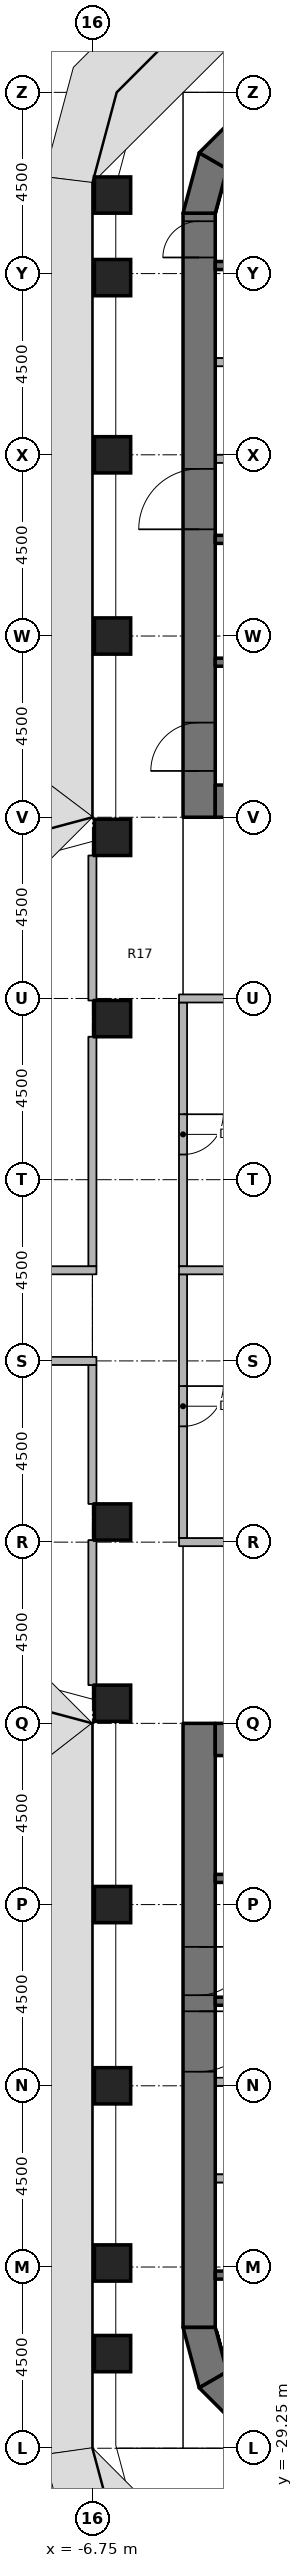
"""IFC4 building model, lengths in metres.
Left out: names, types, materials, properties, quantities, classifications, styles, units other than length and angle.
Written with IfcOpenShell. Run it as: python <this file> out.ifc"""

import sys

from ifc_helpers import new_model, si_unit, direction, frame, frame_2d, origin, origin_2d, place, context, subcontext, project, spatial, polyline, rectangle, outline, extrude, element, fill, save


model = new_model("IFC4")
c1 = context("Model", 3, precision=1e-05, world=origin(), true_north=direction((0.0, 1.0)))
c2 = subcontext(c1, "Body", "Model", "MODEL_VIEW")
j1 = project(units=[si_unit("LENGTHUNIT", "METRE"), si_unit("PLANEANGLEUNIT", "RADIAN")], contexts=[c1])
p1 = place(None, origin())
s1 = spatial("IfcSite", under=j1, at=p1, CompositionType="ELEMENT")
p2 = place(p1, origin())
s2 = spatial("IfcBuilding", under=s1, at=p2, CompositionType="ELEMENT")
p3 = place(p2, frame((0.0, 0.0, 109.4)))
s3 = spatial("IfcBuildingStorey", under=s2, at=p3, CompositionType="ELEMENT", Elevation=109.4)
for number, where, z_axis, x_axis in (
    (1, (-6.25, -26.9, 0.0), (0.0, 0.0, 1.0), (1.0, 0.0, 0.0)),
    (2, (-6.25, -24.65, 0.0), (0.0, 0.0, 1.0), (1.0, 0.0, 0.0)),
    (3, (-6.25, -20.25, 0.0), (0.0, 0.0, 1.0), (1.0, 0.0, 0.0)),
    (4, (-6.25, -15.75, 0.0), (0.0, 0.0, 1.0), (1.0, 0.0, 0.0)),
    (5, (-6.25, -10.75, 0.0), (0.0, 0.0, 1.0), (1.0, 0.0, 0.0)),
    (6, (-6.25, -6.25, 0.0), (0.0, 0.0, 1.0), (1.0, 0.0, 0.0)),
    (7, (-6.25, 6.25, 0.0), (0.0, 0.0, 1.0), (1.0, 0.0, 0.0)),
    (8, (-6.25, 10.75, 0.0), (0.0, 0.0, 1.0), (1.0, 0.0, 0.0)),
    (9, (-6.25, 15.75, 0.0), (0.0, 0.0, 1.0), (1.0, 0.0, 0.0)),
    (10, (-6.25, 20.25, 0.0), (0.0, 0.0, 1.0), (1.0, 0.0, 0.0)),
    (11, (-6.25, 24.65, 0.0), (0.0, 0.0, 1.0), (1.0, 0.0, 0.0)),
    (12, (-6.25, 26.7, 0.0), (0.0, 0.0, 1.0), (1.0, 0.0, 0.0)),
):
    element("IfcColumn", number, at=place(p3, frame(where, z_axis=z_axis, x_axis=x_axis)), inside=s3, PredefinedType="COLUMN", context=c2, shape_type="SweptSolid", body=[
        extrude(rectangle(XDim=0.9, YDim=0.9, at=origin_2d()), origin(), (0.0, 0.0, 1.0), 3.65),
    ])
p4 = place(p3, frame((-4.1, 11.25, 0.0), z_axis=(0.0, 0.0, 1.0), x_axis=(0.0, 1.0, 0.0)))
e13 = element("IfcWall", 13, at=p4, inside=s3, PredefinedType="SHEAR", context=c2, shape_type="SweptSolid", body=[
    extrude(rectangle(XDim=15.0, YDim=0.8, at=frame_2d((7.5, 0.0))), origin(), (0.0, 0.0, 1.0), 3.8),
])
p5 = place(p4, frame((7.15, 0.0, 0.0)))
e14 = element("IfcOpeningElement", 14, at=p5, cuts=e13, PredefinedType="OPENING", context=c2, shape_type="SweptSolid", body=[
    extrude(rectangle(XDim=1.5, YDim=2.3, at=frame_2d((0.75, 1.15))), frame((0.0, 0.41, 0.0), z_axis=(0.0, -1.0, 0.0), x_axis=(1.0, 0.0, 0.0)), (0.0, 0.0, 1.0), 0.82),
])
p6 = place(p4, frame((13.9, 0.0, 0.0)))
e15 = element("IfcOpeningElement", 15, at=p6, cuts=e13, PredefinedType="OPENING", context=c2, shape_type="SweptSolid", body=[
    extrude(rectangle(XDim=0.9, YDim=2.1, at=frame_2d((0.45, 1.05))), frame((0.0, 0.41, 0.0), z_axis=(0.0, -1.0, 0.0), x_axis=(1.0, 0.0, 0.0)), (0.0, 0.0, 1.0), 0.82),
])
p7 = place(p4, frame((1.15, 0.0, 0.0)))
e16 = element("IfcOpeningElement", 16, at=p7, cuts=e13, PredefinedType="OPENING", context=c2, shape_type="SweptSolid", body=[
    extrude(rectangle(XDim=1.2, YDim=2.1, at=frame_2d((0.6, 1.05))), frame((0.0, 0.41, 0.0), z_axis=(0.0, -1.0, 0.0), x_axis=(1.0, 0.0, 0.0)), (0.0, 0.0, 1.0), 0.82),
])
p8 = place(p3, frame((-3.7, 11.65, 0.0), z_axis=(0.0, 0.0, 1.0), x_axis=(1.0, 0.0, 0.0)))
e17 = element("IfcWall", 17, at=p8, inside=s3, PredefinedType="SHEAR", context=c2, shape_type="SweptSolid", body=[
    extrude(rectangle(XDim=7.4, YDim=0.8, at=frame_2d((3.7, 0.0))), origin(), (0.0, 0.0, 1.0), 3.8),
])
p9 = place(p3, origin())
e18 = element("IfcWall", 18, at=p9, inside=s3, PredefinedType="SHEAR", context=c2, shape_type="SweptSolid", body=[
    extrude(outline(polyline([(-4.5, 26.25), (-4.098, 27.75), (-3.405, 27.35), (-3.7, 26.25), (-4.5, 26.25)])), origin(), (0.0, 0.0, 1.0), 3.8),
])
p10 = place(p3, origin())
e19 = element("IfcWall", 19, at=p10, inside=s3, PredefinedType="SHEAR", context=c2, shape_type="SweptSolid", body=[
    extrude(outline(polyline([(-4.098, 27.75), (-3.0, 28.848), (-2.6, 28.155), (-3.405, 27.35), (-4.098, 27.75)])), origin(), (0.0, 0.0, 1.0), 3.8),
])
p11 = place(p3, frame((-4.1, -11.25, 0.0), z_axis=(0.0, 0.0, 1.0), x_axis=(0.0, -1.0, 0.0)))
e20 = element("IfcWall", 20, at=p11, inside=s3, PredefinedType="SHEAR", context=c2, shape_type="SweptSolid", body=[
    extrude(rectangle(XDim=15.0, YDim=0.8, at=frame_2d((7.5, 0.0))), origin(), (0.0, 0.0, 1.0), 3.8),
])
p12 = place(p11, frame((7.15, 0.0, 0.0)))
e21 = element("IfcOpeningElement", 21, at=p12, cuts=e20, PredefinedType="OPENING", context=c2, shape_type="SweptSolid", body=[
    extrude(rectangle(XDim=1.5, YDim=2.3, at=frame_2d((0.75, 1.15))), frame((0.0, 0.41, 0.0), z_axis=(0.0, -1.0, 0.0), x_axis=(1.0, 0.0, 0.0)), (0.0, 0.0, 1.0), 0.82),
])
p13 = place(p11, frame((5.55, 0.0, 0.0)))
e22 = element("IfcOpeningElement", 22, at=p13, cuts=e20, PredefinedType="OPENING", context=c2, shape_type="SweptSolid", body=[
    extrude(rectangle(XDim=1.2, YDim=2.1, at=frame_2d((0.6, 1.05))), frame((0.0, 0.41, 0.0), z_axis=(0.0, -1.0, 0.0), x_axis=(1.0, 0.0, 0.0)), (0.0, 0.0, 1.0), 0.82),
])
p14 = place(p3, frame((-3.7, -11.65, 0.0), z_axis=(0.0, 0.0, 1.0), x_axis=(1.0, 0.0, 0.0)))
e23 = element("IfcWall", 23, at=p14, inside=s3, PredefinedType="SHEAR", context=c2, shape_type="SweptSolid", body=[
    extrude(rectangle(XDim=7.4, YDim=0.8, at=frame_2d((3.7, 0.0))), origin(), (0.0, 0.0, 1.0), 3.8),
])
p15 = place(p3, origin())
e24 = element("IfcWall", 24, at=p15, inside=s3, PredefinedType="SHEAR", context=c2, shape_type="SweptSolid", body=[
    extrude(outline(polyline([(-4.5, -26.25), (-4.098, -27.75), (-3.405, -27.35), (-3.7, -26.25), (-4.5, -26.25)])), origin(), (0.0, 0.0, 1.0), 3.8),
])
p16 = place(p3, origin())
e25 = element("IfcWall", 25, at=p16, inside=s3, PredefinedType="SHEAR", context=c2, shape_type="SweptSolid", body=[
    extrude(outline(polyline([(-4.098, -27.75), (-3.0, -28.848), (-2.6, -28.155), (-3.405, -27.35), (-4.098, -27.75)])), origin(), (0.0, 0.0, 1.0), 3.8),
])
for number, where, z_axis, x_axis in (
    (26, (-3.7, 24.95, 0.0), (0.0, 0.0, 1.0), (1.0, 0.0, 0.0)),
    (27, (-3.7, 18.15, 0.0), (0.0, 0.0, 1.0), (1.0, 0.0, 0.0)),
    (28, (-3.7, 15.1, 0.0), (0.0, 0.0, 1.0), (1.0, 0.0, 0.0)),
):
    element("IfcWall", number, at=place(p3, frame(where, z_axis=z_axis, x_axis=x_axis)), inside=s3, PredefinedType="SHEAR", context=c2, shape_type="SweptSolid", body=[
        extrude(rectangle(XDim=7.4, YDim=0.2, at=frame_2d((3.7, 0.0))), origin(), (0.0, 0.0, 1.0), 3.65),
    ])
p17 = place(p3, frame((-3.7, 20.15, 0.0), z_axis=(0.0, 0.0, 1.0), x_axis=(1.0, 0.0, 0.0)))
e29 = element("IfcWall", 29, at=p17, inside=s3, PredefinedType="PARTITIONING", context=c2, shape_type="SweptSolid", body=[
    extrude(rectangle(XDim=2.8, YDim=0.2, at=frame_2d((1.4, 0.0))), origin(), (0.0, 0.0, 1.0), 3.65),
])
p18 = place(p3, frame((-3.7, 22.55, 0.0), z_axis=(0.0, 0.0, 1.0), x_axis=(1.0, 0.0, 0.0)))
e30 = element("IfcWall", 30, at=p18, inside=s3, PredefinedType="PARTITIONING", context=c2, shape_type="SweptSolid", body=[
    extrude(rectangle(XDim=2.6, YDim=0.2, at=frame_2d((1.3, 0.0))), origin(), (0.0, 0.0, 1.0), 3.65),
])
for number, where, z_axis, x_axis in (
    (31, (3.7, -24.95, 0.0), (0.0, 0.0, 1.0), (-1.0, 0.0, 0.0)),
    (32, (3.7, -18.15, 0.0), (0.0, 0.0, 1.0), (-1.0, 0.0, 0.0)),
    (33, (3.7, -15.1, 0.0), (0.0, 0.0, 1.0), (-1.0, 0.0, 0.0)),
):
    element("IfcWall", number, at=place(p3, frame(where, z_axis=z_axis, x_axis=x_axis)), inside=s3, PredefinedType="SHEAR", context=c2, shape_type="SweptSolid", body=[
        extrude(rectangle(XDim=7.4, YDim=0.2, at=frame_2d((3.7, 0.0))), origin(), (0.0, 0.0, 1.0), 3.65),
    ])
p19 = place(p3, frame((-0.9, -20.15, 0.0), z_axis=(0.0, 0.0, 1.0), x_axis=(-1.0, 0.0, 0.0)))
e34 = element("IfcWall", 34, at=p19, inside=s3, PredefinedType="PARTITIONING", context=c2, shape_type="SweptSolid", body=[
    extrude(rectangle(XDim=2.8, YDim=0.2, at=frame_2d((1.4, 0.0))), origin(), (0.0, 0.0, 1.0), 3.65),
])
p20 = place(p3, frame((-1.1, -22.55, 0.0), z_axis=(0.0, 0.0, 1.0), x_axis=(-1.0, 0.0, 0.0)))
e35 = element("IfcWall", 35, at=p20, inside=s3, PredefinedType="PARTITIONING", context=c2, shape_type="SweptSolid", body=[
    extrude(rectangle(XDim=2.6, YDim=0.2, at=frame_2d((1.3, 0.0))), origin(), (0.0, 0.0, 1.0), 3.65),
])
p21 = place(p3, frame((-4.5, 6.65, 0.0), z_axis=(0.0, 0.0, 1.0), x_axis=(0.0, -1.0, 0.0)))
e36 = element("IfcWall", 36, at=p21, inside=s3, PredefinedType="PARTITIONING", context=c2, shape_type="SweptSolid", body=[
    extrude(rectangle(XDim=6.55, YDim=0.2, at=frame_2d((3.275, 0.0))), origin(), (0.0, 0.0, 1.0), 2.738),
])
p22 = place(p21, frame((2.775, 0.0, 0.0)))
e37 = element("IfcOpeningElement", 37, at=p22, cuts=e36, PredefinedType="OPENING", context=c2, shape_type="SweptSolid", body=[
    extrude(rectangle(XDim=1.0, YDim=2.1, at=frame_2d((0.5, 1.05))), frame((0.0, 0.11, 0.0), z_axis=(0.0, -1.0, 0.0), x_axis=(1.0, 0.0, 0.0)), (0.0, 0.0, 1.0), 0.22),
])
p23 = place(p3, frame((-4.5, -0.1, 0.0), z_axis=(0.0, 0.0, 1.0), x_axis=(0.0, -1.0, 0.0)))
e38 = element("IfcWall", 38, at=p23, inside=s3, PredefinedType="PARTITIONING", context=c2, shape_type="SweptSolid", body=[
    extrude(rectangle(XDim=6.55, YDim=0.2, at=frame_2d((3.275, 0.0))), origin(), (0.0, 0.0, 1.0), 2.738),
])
p24 = place(p23, frame((2.775, 0.0, 0.0)))
e39 = element("IfcOpeningElement", 39, at=p24, cuts=e38, PredefinedType="OPENING", context=c2, shape_type="SweptSolid", body=[
    extrude(rectangle(XDim=1.0, YDim=2.1, at=frame_2d((0.5, 1.05))), frame((0.0, 0.11, 0.0), z_axis=(0.0, -1.0, 0.0), x_axis=(1.0, 0.0, 0.0)), (0.0, 0.0, 1.0), 0.22),
])
p25 = place(p3, frame((-6.75, 0.1, 0.0), z_axis=(0.0, 0.0, 1.0), x_axis=(0.0, 1.0, 0.0)))
e40 = element("IfcWall", 40, at=p25, inside=s3, PredefinedType="PARTITIONING", context=c2, shape_type="SweptSolid", body=[
    extrude(rectangle(XDim=5.7, YDim=0.2, at=frame_2d((2.85, 0.0))), origin(), (0.0, 0.0, 1.0), 2.738),
])
for number, where, z_axis, x_axis in (
    (41, (-6.75, 6.7, 0.0), (0.0, 0.0, 1.0), (0.0, 1.0, 0.0)),
    (42, (-6.75, -10.3, 0.0), (0.0, 0.0, 1.0), (0.0, 1.0, 0.0)),
):
    element("IfcWall", number, at=place(p3, frame(where, z_axis=z_axis, x_axis=x_axis)), inside=s3, PredefinedType="PARTITIONING", context=c2, shape_type="SweptSolid", body=[
        extrude(rectangle(XDim=3.6, YDim=0.2, at=frame_2d((1.8, 0.0))), origin(), (0.0, 0.0, 1.0), 2.738),
    ])
p26 = place(p3, frame((-6.75, -5.8, 0.0), z_axis=(0.0, 0.0, 1.0), x_axis=(0.0, 1.0, 0.0)))
e43 = element("IfcWall", 43, at=p26, inside=s3, PredefinedType="PARTITIONING", context=c2, shape_type="SweptSolid", body=[
    extrude(rectangle(XDim=3.45, YDim=0.2, at=frame_2d((1.725, 0.0))), origin(), (0.0, 0.0, 1.0), 2.738),
])
for number, where, z_axis, x_axis in (
    (44, (-4.6, 6.75, 0.0), (0.0, 0.0, 1.0), (1.0, 0.0, 0.0)),
    (45, (-4.6, -6.75, 0.0), (0.0, 0.0, 1.0), (1.0, 0.0, 0.0)),
    (46, (-4.6, 0.0, 0.0), (0.0, 0.0, 1.0), (1.0, 0.0, 0.0)),
):
    element("IfcWall", number, at=place(p3, frame(where, z_axis=z_axis, x_axis=x_axis)), inside=s3, PredefinedType="PARTITIONING", context=c2, shape_type="SweptSolid", body=[
        extrude(rectangle(XDim=4.7, YDim=0.2, at=frame_2d((2.35, 0.0))), origin(), (0.0, 0.0, 1.0), 2.738),
    ])
p27 = place(p3, frame((-11.35, 0.0, 0.0), z_axis=(0.0, 0.0, 1.0), x_axis=(1.0, 0.0, 0.0)))
e47 = element("IfcWall", 47, at=p27, inside=s3, PredefinedType="PARTITIONING", context=c2, shape_type="SweptSolid", body=[
    extrude(rectangle(XDim=4.7, YDim=0.2, at=frame_2d((2.35, 0.0))), origin(), (0.0, 0.0, 1.0), 2.738),
])
p28 = place(p27, frame((1.85, 0.0, 0.0)))
e48 = element("IfcOpeningElement", 48, at=p28, cuts=e47, PredefinedType="OPENING", context=c2, shape_type="SweptSolid", body=[
    extrude(rectangle(XDim=1.0, YDim=2.1, at=frame_2d((0.5, 1.05))), frame((0.0, 0.11, 0.0), z_axis=(0.0, -1.0, 0.0), x_axis=(1.0, 0.0, 0.0)), (0.0, 0.0, 1.0), 0.22),
])
p29 = place(p3, frame((-6.65, -2.25, 0.0), z_axis=(0.0, 0.0, 1.0), x_axis=(-1.0, 0.0, 0.0)))
e49 = element("IfcWall", 49, at=p29, inside=s3, PredefinedType="PARTITIONING", context=c2, shape_type="SweptSolid", body=[
    extrude(rectangle(XDim=4.7, YDim=0.2, at=frame_2d((2.35, 0.0))), origin(), (0.0, 0.0, 1.0), 2.738),
])
p30 = place(p29, frame((1.85, 0.0, 0.0)))
e50 = element("IfcOpeningElement", 50, at=p30, cuts=e49, PredefinedType="OPENING", context=c2, shape_type="SweptSolid", body=[
    extrude(rectangle(XDim=1.0, YDim=2.1, at=frame_2d((0.5, 1.05))), frame((0.0, 0.11, 0.0), z_axis=(0.0, -1.0, 0.0), x_axis=(1.0, 0.0, 0.0)), (0.0, 0.0, 1.0), 0.22),
])
p31 = place(p5, origin())
e51 = element("IfcDoor", 51, at=p31, inside=s3, OperationType="DOUBLE_DOOR_SINGLE_SWING", PredefinedType="DOOR", context=c2, shape_type="SweptSolid", body=[
    extrude(rectangle(XDim=1.5, YDim=2.3, at=frame_2d((0.75, 1.15))), frame((0.0, 0.025, 0.0), z_axis=(0.0, -1.0, 0.0), x_axis=(1.0, 0.0, 0.0)), (0.0, 0.0, 1.0), 0.05),
])
fill(e14, e51)
p32 = place(p6, origin())
e52 = element("IfcDoor", 52, at=p32, inside=s3, OperationType="SINGLE_SWING_RIGHT", PredefinedType="DOOR", context=c2, shape_type="SweptSolid", body=[
    extrude(rectangle(XDim=0.9, YDim=2.1, at=frame_2d((0.45, 1.05))), frame((0.0, 0.025, 0.0), z_axis=(0.0, -1.0, 0.0), x_axis=(1.0, 0.0, 0.0)), (0.0, 0.0, 1.0), 0.05),
])
fill(e15, e52)
p33 = place(p7, origin())
e53 = element("IfcDoor", 53, at=p33, inside=s3, OperationType="SINGLE_SWING_LEFT", PredefinedType="DOOR", context=c2, shape_type="SweptSolid", body=[
    extrude(rectangle(XDim=1.2, YDim=2.1, at=frame_2d((0.6, 1.05))), frame((0.0, 0.025, 0.0), z_axis=(0.0, -1.0, 0.0), x_axis=(1.0, 0.0, 0.0)), (0.0, 0.0, 1.0), 0.05),
])
fill(e16, e53)
p34 = place(p12, origin())
e54 = element("IfcDoor", 54, at=p34, inside=s3, OperationType="DOUBLE_DOOR_SINGLE_SWING", PredefinedType="DOOR", context=c2, shape_type="SweptSolid", body=[
    extrude(rectangle(XDim=1.5, YDim=2.3, at=frame_2d((0.75, 1.15))), frame((0.0, 0.025, 0.0), z_axis=(0.0, -1.0, 0.0), x_axis=(1.0, 0.0, 0.0)), (0.0, 0.0, 1.0), 0.05),
])
fill(e21, e54)
p35 = place(p13, origin())
e55 = element("IfcDoor", 55, at=p35, inside=s3, OperationType="SINGLE_SWING_RIGHT", PredefinedType="DOOR", context=c2, shape_type="SweptSolid", body=[
    extrude(rectangle(XDim=1.2, YDim=2.1, at=frame_2d((0.6, 1.05))), frame((0.0, 0.025, 0.0), z_axis=(0.0, -1.0, 0.0), x_axis=(1.0, 0.0, 0.0)), (0.0, 0.0, 1.0), 0.05),
])
fill(e22, e55)
p36 = place(p22, origin())
e56 = element("IfcDoor", 56, at=p36, inside=s3, OperationType="SINGLE_SWING_RIGHT", PredefinedType="DOOR", context=c2, shape_type="SweptSolid", body=[
    extrude(rectangle(XDim=1.0, YDim=2.1, at=frame_2d((0.5, 1.05))), frame((0.0, 0.025, 0.0), z_axis=(0.0, -1.0, 0.0), x_axis=(1.0, 0.0, 0.0)), (0.0, 0.0, 1.0), 0.05),
])
fill(e37, e56)
p37 = place(p24, origin())
e57 = element("IfcDoor", 57, at=p37, inside=s3, OperationType="SINGLE_SWING_LEFT", PredefinedType="DOOR", context=c2, shape_type="SweptSolid", body=[
    extrude(rectangle(XDim=1.0, YDim=2.1, at=frame_2d((0.5, 1.05))), frame((0.0, 0.025, 0.0), z_axis=(0.0, -1.0, 0.0), x_axis=(1.0, 0.0, 0.0)), (0.0, 0.0, 1.0), 0.05),
])
fill(e39, e57)
save(model, sys.argv[1])
